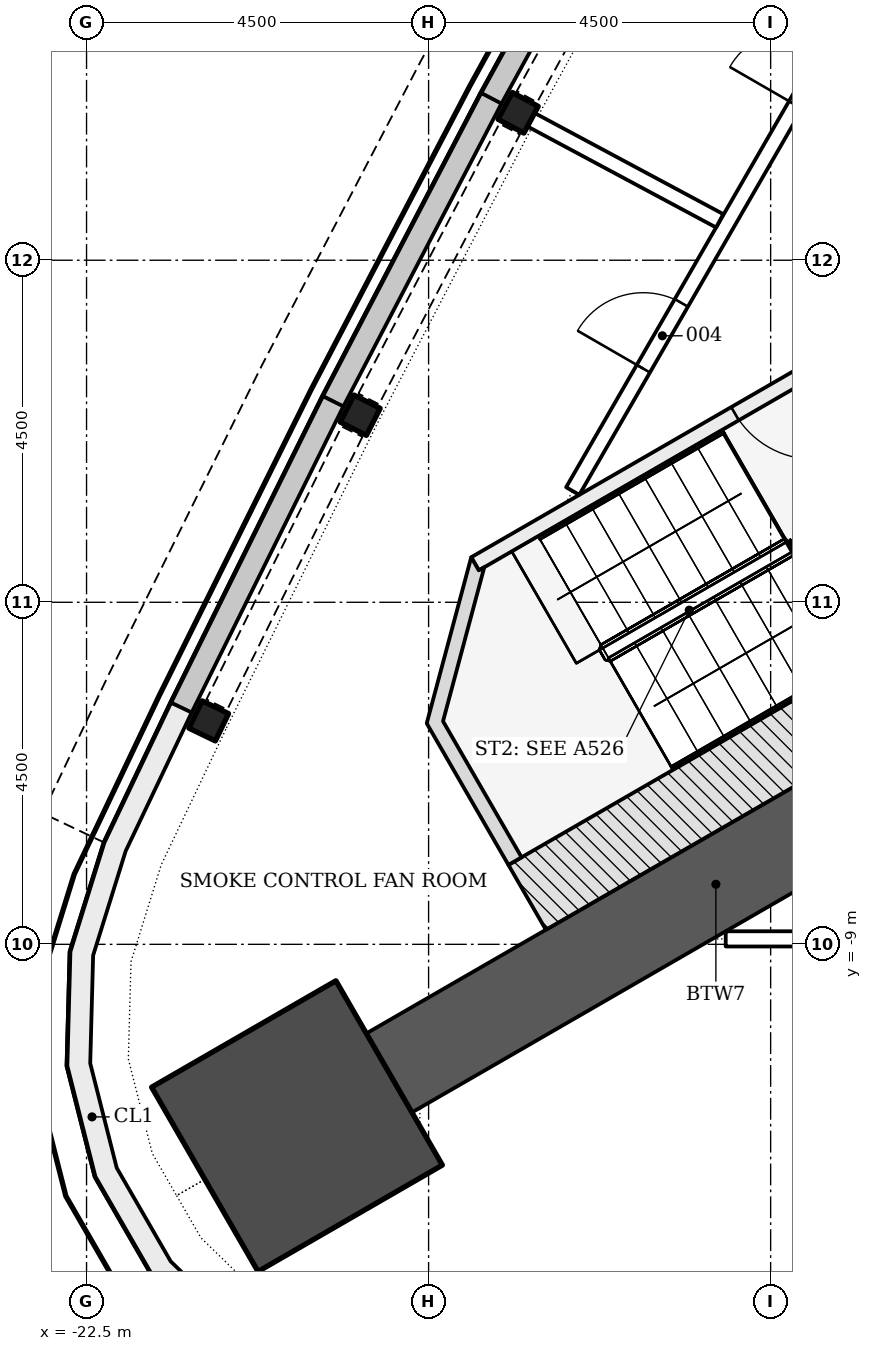
"""IFC4 building model, lengths in metres.
Left out: names, types, materials, properties, quantities, classifications, styles, units other than length and angle.
Written with IfcOpenShell. Run it as: python <this file> out.ifc"""

import sys

from ifc_helpers import new_model, si_unit, direction, frame, frame_2d, origin, origin_2d, place, context, subcontext, project, spatial, polyline, rectangle, i_section, outline, extrude, element, fill, save


model = new_model("IFC4")
c1 = context("Model", 3, precision=1e-05, world=origin(), true_north=direction((0.0, 1.0)))
c2 = subcontext(c1, "Body", "Model", "MODEL_VIEW")
j1 = project(units=[si_unit("LENGTHUNIT", "METRE"), si_unit("PLANEANGLEUNIT", "RADIAN")], contexts=[c1])
p1 = place(None, origin())
s1 = spatial("IfcSite", under=j1, at=p1, CompositionType="ELEMENT")
p2 = place(p1, origin())
s2 = spatial("IfcBuilding", under=s1, at=p2, CompositionType="ELEMENT")
p3 = place(p2, frame((0.0, 0.0, 168.9)))
s3 = spatial("IfcBuildingStorey", under=s2, at=p3, CompositionType="ELEMENT", Elevation=168.9)
p4 = place(p3, frame((-9.922, -5.728, -0.3), z_axis=(0.0, 0.0, 1.0), x_axis=(-0.866029553954, -0.499992811627, 0.0)))
e1 = element("IfcWall", 1, at=p4, inside=s3, PredefinedType="SHEAR", context=c2, shape_type="SweptSolid", body=[
    extrude(rectangle(XDim=9.927, YDim=1.2, at=frame_2d((4.964, 0.0))), origin(), (0.0, 0.0, 1.0), 5.5),
])
p5 = place(p3, frame((-19.731, -11.392, -0.3), z_axis=(0.0, 0.0, 1.0), x_axis=(-0.866025403784, -0.5, 0.0)))
e2 = element("IfcColumn", 2, at=p5, inside=s3, PredefinedType="COLUMN", context=c2, shape_type="SweptSolid", body=[
    extrude(rectangle(XDim=2.8, YDim=2.8, at=origin_2d()), origin(), (0.0, 0.0, 1.0), 5.5),
])
for number, where, z_axis, x_axis in (
    (3, (-16.822, 1.939, -0.3), (0.0, 0.0, 1.0), (-0.472, -0.881, 0.0)),
    (4, (-18.9, -2.039, -0.3), (0.0, 0.0, 1.0), (-0.453, -0.891, 0.0)),
    (5, (-20.893, -6.061, -0.3), (0.0, 0.0, 1.0), (-0.434, -0.901, 0.0)),
):
    element("IfcColumn", number, at=place(p3, frame(where, z_axis=z_axis, x_axis=x_axis)), inside=s3, PredefinedType="COLUMN", context=c2, shape_type="SweptSolid", body=[
        extrude(i_section(OverallWidth=0.399, OverallDepth=0.386, WebThickness=0.021, FlangeThickness=0.033, FilletRadius=0.015, at=origin_2d()), origin(), (0.0, 0.0, 1.0), 5.5),
    ])
p6 = place(p3, origin())
e6 = element("IfcWall", 6, at=p6, inside=s3, PredefinedType="NOTDEFINED", context=c2, shape_type="SweptSolid", body=[
    extrude(outline(polyline([(-15.14, 6.143), (-17.307, 2.199), (-17.044, 2.055), (-14.877, 5.999), (-15.14, 6.143)])), origin(), (0.0, 0.0, 1.0), 1.2),
])
p7 = place(p3, origin())
e7 = element("IfcWall", 7, at=p7, inside=s3, PredefinedType="NOTDEFINED", context=c2, shape_type="SweptSolid", body=[
    extrude(outline(polyline([(-17.307, 2.199), (-19.39, -1.79), (-19.124, -1.928), (-17.041, 2.061), (-17.307, 2.199)])), origin(), (0.0, 0.0, 1.0), 1.2),
])
p8 = place(p3, origin())
e8 = element("IfcWall", 8, at=p8, inside=s3, PredefinedType="NOTDEFINED", context=c2, shape_type="SweptSolid", body=[
    extrude(outline(polyline([(-19.39, -1.79), (-21.388, -5.822), (-21.119, -5.955), (-19.121, -1.923), (-19.39, -1.79)])), origin(), (0.0, 0.0, 1.0), 1.2),
])
p9 = place(p3, origin())
e9 = element("IfcWall", 9, at=p9, inside=s3, PredefinedType="NOTDEFINED", context=c2, shape_type="SweptSolid", body=[
    extrude(outline(polyline([(-21.388, -5.822), (-22.265, -7.662), (-22.712, -9.097), (-22.753, -10.599), (-22.383, -12.055), (-21.632, -13.357), (-20.555, -14.405), (-19.234, -15.121), (-17.768, -15.451), (-15.736, -15.612), (-15.712, -15.312), (-17.723, -15.154), (-19.128, -14.837), (-20.376, -14.161), (-21.393, -13.171), (-22.103, -11.941), (-22.452, -10.565), (-22.413, -9.146), (-21.985, -7.772), (-21.117, -5.951), (-21.388, -5.822)])), origin(), (0.0, 0.0, 1.0), 5.2),
])
p10 = place(p3, frame((-12.539, -1.194, -0.3), z_axis=(0.0, 0.0, 1.0), x_axis=(-0.866045472092, -0.499965239061, 0.0)))
e10 = element("IfcWall", 10, at=p10, inside=s3, PredefinedType="SHEAR", context=c2, shape_type="SweptSolid", body=[
    extrude(rectangle(XDim=5.6, YDim=0.2, at=frame_2d((2.8, 0.0))), origin(), (0.0, 0.0, 1.0), 5.5),
])
p11 = place(p10, frame((0.45, 0.0, 0.3)))
e11 = element("IfcOpeningElement", 11, at=p11, cuts=e10, PredefinedType="OPENING", context=c2, shape_type="SweptSolid", body=[
    extrude(rectangle(XDim=1.2, YDim=2.1, at=frame_2d((0.6, 1.05))), frame((0.0, 0.11, 0.0), z_axis=(0.0, -1.0, 0.0), x_axis=(1.0, 0.0, 0.0)), (0.0, 0.0, 1.0), 0.22),
])
p12 = place(p3, frame((-10.468, -4.782, -0.3), z_axis=(0.0, 0.0, 1.0), x_axis=(-0.866018442252, -0.500012057535, 0.0)))
e12 = element("IfcWall", 12, at=p12, inside=s3, PredefinedType="SHEAR", context=c2, shape_type="SweptSolid", body=[
    extrude(rectangle(XDim=7.2, YDim=0.986, at=frame_2d((3.6, 0.0))), origin(), (0.0, 0.0, 1.0), 5.5),
])
p13 = place(p3, frame((0.0, 0.0, -0.3)))
e13 = element("IfcWall", 13, at=p13, inside=s3, PredefinedType="SHEAR", context=c2, shape_type="SweptSolid", body=[
    extrude(outline(polyline([(-17.439, -3.907), (-18.025, -6.093), (-16.95, -7.955), (-16.777, -7.855), (-17.81, -6.065), (-17.267, -4.039), (-17.339, -4.081), (-17.339, -4.081), (-17.339, -4.081), (-17.339, -4.081), (-17.339, -4.081), (-17.339, -4.081), (-17.339, -4.081), (-17.339, -4.081), (-17.339, -4.081), (-17.339, -4.081), (-17.339, -4.081), (-17.339, -4.081), (-17.339, -4.081), (-17.339, -4.081), (-17.339, -4.081), (-17.339, -4.081), (-17.339, -4.081), (-17.439, -3.907)])), origin(), (0.0, 0.0, 1.0), 5.5),
])
p14 = place(p3, frame((-16.104, -3.037, 0.0), z_axis=(0.0, 0.0, 1.0), x_axis=(0.500000282061, 0.866025240936, 0.0)))
e14 = element("IfcWall", 14, at=p14, inside=s3, PredefinedType="PARTITIONING", context=c2, shape_type="SweptSolid", body=[
    extrude(rectangle(XDim=29.235, YDim=0.2, at=frame_2d((14.617, 0.0))), origin(), (0.0, 0.0, 1.0), 4.647),
])
p15 = place(p14, frame((20.65, 0.0, 0.0)))
e15 = element("IfcOpeningElement", 15, at=p15, cuts=e14, PredefinedType="OPENING", context=c2, shape_type="SweptSolid", body=[
    extrude(rectangle(XDim=1.0, YDim=2.1, at=frame_2d((0.5, 1.05))), frame((0.0, 0.11, 0.0), z_axis=(0.0, -1.0, 0.0), x_axis=(1.0, 0.0, 0.0)), (0.0, 0.0, 1.0), 0.22),
])
p16 = place(p14, frame((10.287, 0.0, 0.0)))
e16 = element("IfcOpeningElement", 16, at=p16, cuts=e14, PredefinedType="OPENING", context=c2, shape_type="SweptSolid", body=[
    extrude(rectangle(XDim=1.0, YDim=2.1, at=frame_2d((0.5, 1.05))), frame((0.0, 0.11, 0.0), z_axis=(0.0, -1.0, 0.0), x_axis=(1.0, 0.0, 0.0)), (0.0, 0.0, 1.0), 0.22),
])
p17 = place(p14, frame((5.865, 0.0, 0.0)))
e17 = element("IfcOpeningElement", 17, at=p17, cuts=e14, PredefinedType="OPENING", context=c2, shape_type="SweptSolid", body=[
    extrude(rectangle(XDim=1.0, YDim=2.1, at=frame_2d((0.5, 1.05))), frame((0.0, 0.11, 0.0), z_axis=(0.0, -1.0, 0.0), x_axis=(1.0, 0.0, 0.0)), (0.0, 0.0, 1.0), 0.22),
])
p18 = place(p14, frame((1.859, 0.0, 0.0)))
e18 = element("IfcOpeningElement", 18, at=p18, cuts=e14, PredefinedType="OPENING", context=c2, shape_type="SweptSolid", body=[
    extrude(rectangle(XDim=1.0, YDim=2.1, at=frame_2d((0.5, 1.05))), frame((0.0, 0.11, 0.0), z_axis=(0.0, -1.0, 0.0), x_axis=(1.0, 0.0, 0.0)), (0.0, 0.0, 1.0), 0.22),
])
p19 = place(p3, frame((-16.69, 1.869, 0.0), z_axis=(0.0, 0.0, 1.0), x_axis=(0.88146473232, -0.472249855136, 0.0)))
e19 = element("IfcWall", 19, at=p19, inside=s3, PredefinedType="PARTITIONING", context=c2, shape_type="SweptSolid", body=[
    extrude(rectangle(XDim=2.858, YDim=0.2, at=frame_2d((1.429, 0.0))), origin(), (0.0, 0.0, 1.0), 4.647),
])
p20 = place(p3, frame((-14.091, -8.928, 0.0), z_axis=(0.0, 0.0, 1.0), x_axis=(1.0, 0.0, 0.0)))
e20 = element("IfcWall", 20, at=p20, inside=s3, PredefinedType="PARTITIONING", context=c2, shape_type="SweptSolid", body=[
    extrude(rectangle(XDim=18.991, YDim=0.2, at=frame_2d((9.495, 0.0))), origin(), (0.0, 0.0, 1.0), 4.647),
])
p21 = place(p20, frame((5.474, 0.0, 0.0)))
e21 = element("IfcOpeningElement", 21, at=p21, cuts=e20, PredefinedType="OPENING", context=c2, shape_type="SweptSolid", body=[
    extrude(rectangle(XDim=1.0, YDim=2.1, at=frame_2d((0.5, 1.05))), frame((0.0, 0.11, 0.0), z_axis=(0.0, -1.0, 0.0), x_axis=(1.0, 0.0, 0.0)), (0.0, 0.0, 1.0), 0.22),
])
p22 = place(p20, frame((13.489, 0.0, 0.0)))
e22 = element("IfcOpeningElement", 22, at=p22, cuts=e20, PredefinedType="OPENING", context=c2, shape_type="SweptSolid", body=[
    extrude(rectangle(XDim=1.0, YDim=2.1, at=frame_2d((0.5, 1.05))), frame((0.0, 0.11, 0.0), z_axis=(0.0, -1.0, 0.0), x_axis=(1.0, 0.0, 0.0)), (0.0, 0.0, 1.0), 0.22),
])
p23 = place(p20, frame((17.018, 0.0, 0.0)))
e23 = element("IfcOpeningElement", 23, at=p23, cuts=e20, PredefinedType="OPENING", context=c2, shape_type="SweptSolid", body=[
    extrude(rectangle(XDim=1.0, YDim=2.1, at=frame_2d((0.5, 1.05))), frame((0.0, 0.11, 0.0), z_axis=(0.0, -1.0, 0.0), x_axis=(1.0, 0.0, 0.0)), (0.0, 0.0, 1.0), 0.22),
])
p24 = place(p11, origin())
e24 = element("IfcDoor", 24, at=p24, inside=s3, OperationType="SINGLE_SWING_LEFT", PredefinedType="DOOR", context=c2, shape_type="SweptSolid", body=[
    extrude(rectangle(XDim=1.2, YDim=2.1, at=frame_2d((0.6, 1.05))), frame((0.0, 0.025, 0.0), z_axis=(0.0, -1.0, 0.0), x_axis=(1.0, 0.0, 0.0)), (0.0, 0.0, 1.0), 0.05),
])
fill(e11, e24)
p25 = place(p18, origin())
e25 = element("IfcDoor", 25, at=p25, inside=s3, OperationType="SINGLE_SWING_LEFT", PredefinedType="DOOR", context=c2, shape_type="SweptSolid", body=[
    extrude(rectangle(XDim=1.0, YDim=2.1, at=frame_2d((0.5, 1.05))), frame((0.0, 0.025, 0.0), z_axis=(0.0, -1.0, 0.0), x_axis=(1.0, 0.0, 0.0)), (0.0, 0.0, 1.0), 0.05),
])
fill(e18, e25)
save(model, sys.argv[1])
